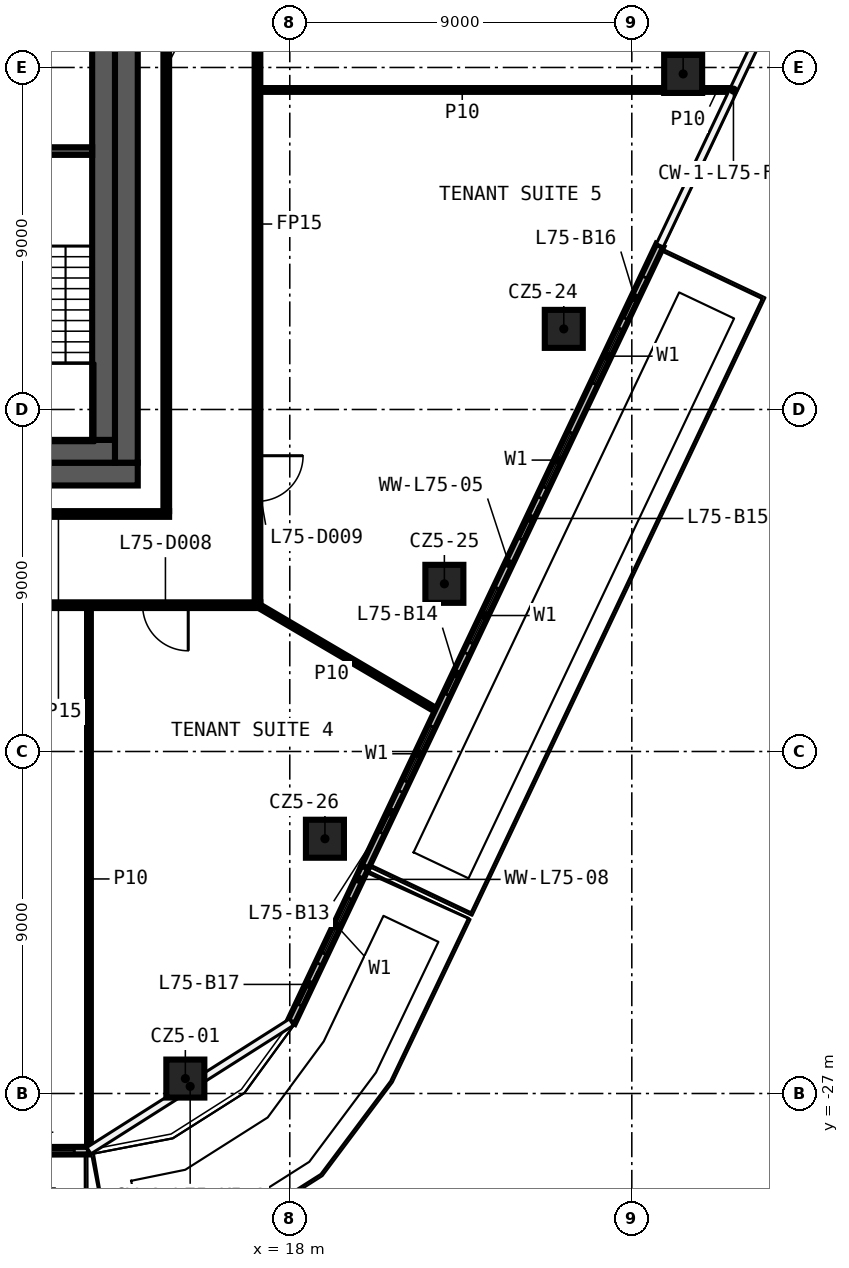
"""IFC4 building model, lengths in metres.
Left out: names, types, materials, properties, quantities, classifications, styles, units other than length and angle.
Written with IfcOpenShell. Run it as: python <this file> out.ifc"""

import sys

from ifc_helpers import new_model, si_unit, direction, frame, frame_2d, origin, origin_2d, place, context, subcontext, project, spatial, rectangle, extrude, element, fill, save


model = new_model("IFC4")
c1 = context("Model", 3, precision=1e-05, world=origin(), true_north=direction((0.0, 1.0)))
c2 = subcontext(c1, "Body", "Model", "MODEL_VIEW")
j1 = project(units=[si_unit("LENGTHUNIT", "METRE"), si_unit("PLANEANGLEUNIT", "RADIAN")], contexts=[c1])
p1 = place(None, origin())
s1 = spatial("IfcSite", under=j1, at=p1, CompositionType="ELEMENT")
p2 = place(p1, origin())
s2 = spatial("IfcBuilding", under=s1, at=p2, CompositionType="ELEMENT")
p3 = place(p2, frame((0.0, 0.0, 348.8)))
s3 = spatial("IfcBuildingStorey", under=s2, at=p3, CompositionType="ELEMENT", Elevation=348.8)
for number, where, z_axis, x_axis in (
    (1, (15.252, -26.607, 0.0), (0.0, 0.0, 1.0), (1.0, 0.0, 0.0)),
    (2, (28.351, -0.17, 0.0), (0.0, 0.0, 1.0), (1.0, 0.0, 0.0)),
    (3, (25.21, -6.879, 0.0), (0.0, 0.0, 1.0), (1.0, 0.0, 0.0)),
    (4, (22.068, -13.588, 0.0), (0.0, 0.0, 1.0), (1.0, 0.0, 0.0)),
    (5, (18.925, -20.296, 0.0), (0.0, 0.0, 1.0), (1.0, 0.0, 0.0)),
):
    element("IfcColumn", number, at=place(p3, frame(where, z_axis=z_axis, x_axis=x_axis)), inside=s3, PredefinedType="COLUMN", context=c2, shape_type="SweptSolid", body=[
        extrude(rectangle(XDim=1.0, YDim=1.0, at=origin_2d()), origin(), (0.0, 0.0, 1.0), 3.7),
    ])
p4 = place(p3, frame((17.225, -14.15, 0.0), z_axis=(0.0, 0.0, 1.0), x_axis=(-1.0, 0.0, 0.0)))
e6 = element("IfcWall", 6, at=p4, inside=s3, PredefinedType="PARTITIONING", context=c2, shape_type="SweptSolid", body=[
    extrude(rectangle(XDim=34.45, YDim=0.15, at=frame_2d((17.225, 0.0))), origin(), (0.0, 0.0, 1.0), 3.7),
])
p5 = place(p4, frame((31.464, 0.0, 0.0)))
e7 = element("IfcOpeningElement", 7, at=p5, cuts=e6, PredefinedType="OPENING", context=c2, shape_type="SweptSolid", body=[
    extrude(rectangle(XDim=1.2, YDim=2.1, at=frame_2d((0.6, 1.05))), frame((0.0, 0.085, 0.0), z_axis=(0.0, -1.0, 0.0), x_axis=(1.0, 0.0, 0.0)), (0.0, 0.0, 1.0), 0.17),
])
p6 = place(p4, frame((24.546, 0.0, 0.0)))
e8 = element("IfcOpeningElement", 8, at=p6, cuts=e6, PredefinedType="OPENING", context=c2, shape_type="SweptSolid", body=[
    extrude(rectangle(XDim=1.2, YDim=2.1, at=frame_2d((0.6, 1.05))), frame((0.0, 0.085, 0.0), z_axis=(0.0, -1.0, 0.0), x_axis=(1.0, 0.0, 0.0)), (0.0, 0.0, 1.0), 0.17),
])
p7 = place(p4, frame((19.962, 0.0, 0.0)))
e9 = element("IfcOpeningElement", 9, at=p7, cuts=e6, PredefinedType="OPENING", context=c2, shape_type="SweptSolid", body=[
    extrude(rectangle(XDim=1.2, YDim=2.1, at=frame_2d((0.6, 1.05))), frame((0.0, 0.085, 0.0), z_axis=(0.0, -1.0, 0.0), x_axis=(1.0, 0.0, 0.0)), (0.0, 0.0, 1.0), 0.17),
])
p8 = place(p4, frame((15.375, 0.0, 0.0)))
e10 = element("IfcOpeningElement", 10, at=p8, cuts=e6, PredefinedType="OPENING", context=c2, shape_type="SweptSolid", body=[
    extrude(rectangle(XDim=1.2, YDim=2.1, at=frame_2d((0.6, 1.05))), frame((0.0, 0.085, 0.0), z_axis=(0.0, -1.0, 0.0), x_axis=(1.0, 0.0, 0.0)), (0.0, 0.0, 1.0), 0.17),
])
p9 = place(p4, frame((10.788, 0.0, 0.0)))
e11 = element("IfcOpeningElement", 11, at=p9, cuts=e6, PredefinedType="OPENING", context=c2, shape_type="SweptSolid", body=[
    extrude(rectangle(XDim=1.2, YDim=2.1, at=frame_2d((0.6, 1.05))), frame((0.0, 0.085, 0.0), z_axis=(0.0, -1.0, 0.0), x_axis=(1.0, 0.0, 0.0)), (0.0, 0.0, 1.0), 0.17),
])
p10 = place(p4, frame((6.202, 0.0, 0.0)))
e12 = element("IfcOpeningElement", 12, at=p10, cuts=e6, PredefinedType="OPENING", context=c2, shape_type="SweptSolid", body=[
    extrude(rectangle(XDim=1.2, YDim=2.1, at=frame_2d((0.6, 1.05))), frame((0.0, 0.085, 0.0), z_axis=(0.0, -1.0, 0.0), x_axis=(1.0, 0.0, 0.0)), (0.0, 0.0, 1.0), 0.17),
])
p11 = place(p4, frame((1.897, 0.0, 0.0)))
e13 = element("IfcOpeningElement", 13, at=p11, cuts=e6, PredefinedType="OPENING", context=c2, shape_type="SweptSolid", body=[
    extrude(rectangle(XDim=1.2, YDim=2.1, at=frame_2d((0.6, 1.05))), frame((0.0, 0.085, 0.0), z_axis=(0.0, -1.0, 0.0), x_axis=(1.0, 0.0, 0.0)), (0.0, 0.0, 1.0), 0.17),
])
p12 = place(p3, frame((9.0, -11.75, 0.0), z_axis=(0.0, 0.0, 1.0), x_axis=(1.0, 0.0, 0.0)))
e14 = element("IfcWall", 14, at=p12, inside=s3, PredefinedType="PARTITIONING", context=c2, shape_type="SweptSolid", body=[
    extrude(rectangle(XDim=5.825, YDim=0.15, at=frame_2d((2.913, 0.0))), origin(), (0.0, 0.0, 1.0), 3.7),
])
p13 = place(p3, frame((17.225, -0.592, 0.0), z_axis=(0.0, 0.0, 1.0), x_axis=(1.0, 0.0, 0.0)))
e15 = element("IfcWall", 15, at=p13, inside=s3, PredefinedType="PARTITIONING", context=c2, shape_type="SweptSolid", body=[
    extrude(rectangle(XDim=10.626, YDim=0.1, at=frame_2d((5.313, 0.0))), origin(), (0.0, 0.0, 1.0), 3.7),
])
p14 = place(p3, frame((28.851, -0.592, 0.0), z_axis=(0.0, 0.0, 1.0), x_axis=(1.0, 0.0, 0.0)))
e16 = element("IfcWall", 16, at=p14, inside=s3, PredefinedType="PARTITIONING", context=c2, shape_type="SweptSolid", body=[
    extrude(rectangle(XDim=0.803, YDim=0.1, at=frame_2d((0.402, 0.0))), origin(), (0.0, 0.0, 1.0), 3.7),
])
p15 = place(p3, frame((17.15, 14.075, 0.0), z_axis=(0.0, 0.0, 1.0), x_axis=(0.0, -1.0, 0.0)))
e17 = element("IfcWall", 17, at=p15, inside=s3, PredefinedType="PARTITIONING", context=c2, shape_type="SweptSolid", body=[
    extrude(rectangle(XDim=28.15, YDim=0.15, at=frame_2d((14.075, 0.0))), origin(), (0.0, 0.0, 1.0), 3.7),
])
p16 = place(p15, frame((24.292, 0.0, 0.0)))
e18 = element("IfcOpeningElement", 18, at=p16, cuts=e17, PredefinedType="OPENING", context=c2, shape_type="SweptSolid", body=[
    extrude(rectangle(XDim=1.2, YDim=2.1, at=frame_2d((0.6, 1.05))), frame((0.0, 0.085, 0.0), z_axis=(0.0, -1.0, 0.0), x_axis=(1.0, 0.0, 0.0)), (0.0, 0.0, 1.0), 0.17),
])
p17 = place(p15, frame((10.898, 0.0, 0.0)))
e19 = element("IfcOpeningElement", 19, at=p17, cuts=e17, PredefinedType="OPENING", context=c2, shape_type="SweptSolid", body=[
    extrude(rectangle(XDim=1.2, YDim=2.1, at=frame_2d((0.6, 1.05))), frame((0.0, 0.085, 0.0), z_axis=(0.0, -1.0, 0.0), x_axis=(1.0, 0.0, 0.0)), (0.0, 0.0, 1.0), 0.17),
])
p18 = place(p15, frame((3.873, 0.0, 0.0)))
e20 = element("IfcOpeningElement", 20, at=p18, cuts=e17, PredefinedType="OPENING", context=c2, shape_type="SweptSolid", body=[
    extrude(rectangle(XDim=1.2, YDim=2.1, at=frame_2d((0.6, 1.05))), frame((0.0, 0.085, 0.0), z_axis=(0.0, -1.0, 0.0), x_axis=(1.0, 0.0, 0.0)), (0.0, 0.0, 1.0), 0.17),
])
p19 = place(p3, frame((14.75, -11.675, 0.0), z_axis=(0.0, 0.0, 1.0), x_axis=(0.0, 1.0, 0.0)))
e21 = element("IfcWall", 21, at=p19, inside=s3, PredefinedType="PARTITIONING", context=c2, shape_type="SweptSolid", body=[
    extrude(rectangle(XDim=23.35, YDim=0.15, at=frame_2d((11.675, 0.0))), origin(), (0.0, 0.0, 1.0), 3.7),
])
p20 = place(p3, frame((12.716, -28.483, 0.0), z_axis=(0.0, 0.0, 1.0), x_axis=(0.0, 1.0, 0.0)))
e22 = element("IfcWall", 22, at=p20, inside=s3, PredefinedType="PARTITIONING", context=c2, shape_type="SweptSolid", body=[
    extrude(rectangle(XDim=14.258, YDim=0.1, at=frame_2d((7.129, 0.0))), origin(), (0.0, 0.0, 1.0), 3.7),
])
p21 = place(p3, frame((17.15, -14.15, 0.0), z_axis=(0.0, 0.0, 1.0), x_axis=(0.862152840624, -0.506648279781, 0.0)))
e23 = element("IfcWall", 23, at=p21, inside=s3, PredefinedType="PARTITIONING", context=c2, shape_type="SweptSolid", body=[
    extrude(rectangle(XDim=5.51, YDim=0.1, at=frame_2d((2.755, 0.0))), origin(), (0.0, 0.0, 1.0), 3.7),
])
p22 = place(p3, frame((-1.042, -28.546, 0.0), z_axis=(0.0, 0.0, 1.0), x_axis=(0.999995287953, 0.003069865224, 0.0)))
e24 = element("IfcWall", 24, at=p22, inside=s3, PredefinedType="SOLIDWALL", context=c2, shape_type="SweptSolid", body=[
    extrude(rectangle(XDim=13.758, YDim=0.2, at=frame_2d((6.879, 0.0))), origin(), (0.0, 0.0, 1.0), 3.7),
])
p23 = place(p22, frame((2.0, 0.0, 0.6)))
e25 = element("IfcOpeningElement", 25, at=p23, cuts=e24, PredefinedType="OPENING", context=c2, shape_type="SweptSolid", body=[
    extrude(rectangle(XDim=1.6, YDim=2.4, at=frame_2d((0.8, 1.2))), frame((0.0, 0.11, 0.0), z_axis=(0.0, -1.0, 0.0), x_axis=(1.0, 0.0, 0.0)), (0.0, 0.0, 1.0), 0.22),
])
p24 = place(p22, frame((0.5, 0.0, 0.0)))
e26 = element("IfcOpeningElement", 26, at=p24, cuts=e24, PredefinedType="OPENING", context=c2, shape_type="SweptSolid", body=[
    extrude(rectangle(XDim=1.2, YDim=2.4, at=frame_2d((0.6, 1.2))), frame((0.0, 0.11, 0.0), z_axis=(0.0, -1.0, 0.0), x_axis=(1.0, 0.0, 0.0)), (0.0, 0.0, 1.0), 0.22),
])
p25 = place(p22, frame((6.586, 0.0, 0.6)))
e27 = element("IfcOpeningElement", 27, at=p25, cuts=e24, PredefinedType="OPENING", context=c2, shape_type="SweptSolid", body=[
    extrude(rectangle(XDim=1.6, YDim=2.4, at=frame_2d((0.8, 1.2))), frame((0.0, 0.11, 0.0), z_axis=(0.0, -1.0, 0.0), x_axis=(1.0, 0.0, 0.0)), (0.0, 0.0, 1.0), 0.22),
])
p26 = place(p22, frame((5.086, 0.0, 0.0)))
e28 = element("IfcOpeningElement", 28, at=p26, cuts=e24, PredefinedType="OPENING", context=c2, shape_type="SweptSolid", body=[
    extrude(rectangle(XDim=1.2, YDim=2.4, at=frame_2d((0.6, 1.2))), frame((0.0, 0.11, 0.0), z_axis=(0.0, -1.0, 0.0), x_axis=(1.0, 0.0, 0.0)), (0.0, 0.0, 1.0), 0.22),
])
p27 = place(p22, frame((11.772, 0.0, 0.6)))
e29 = element("IfcOpeningElement", 29, at=p27, cuts=e24, PredefinedType="OPENING", context=c2, shape_type="SweptSolid", body=[
    extrude(rectangle(XDim=1.6, YDim=2.4, at=frame_2d((0.8, 1.2))), frame((0.0, 0.11, 0.0), z_axis=(0.0, -1.0, 0.0), x_axis=(1.0, 0.0, 0.0)), (0.0, 0.0, 1.0), 0.22),
])
p28 = place(p22, frame((10.272, 0.0, 0.0)))
e30 = element("IfcOpeningElement", 30, at=p28, cuts=e24, PredefinedType="OPENING", context=c2, shape_type="SweptSolid", body=[
    extrude(rectangle(XDim=1.2, YDim=2.4, at=frame_2d((0.6, 1.2))), frame((0.0, 0.11, 0.0), z_axis=(0.0, -1.0, 0.0), x_axis=(1.0, 0.0, 0.0)), (0.0, 0.0, 1.0), 0.22),
])
p29 = place(p3, frame((19.978, -21.042, 0.0), z_axis=(0.0, 0.0, 1.0), x_axis=(0.428526209531, 0.903529350793, 0.0)))
e31 = element("IfcWall", 31, at=p29, inside=s3, PredefinedType="SOLIDWALL", context=c2, shape_type="SweptSolid", body=[
    extrude(rectangle(XDim=18.107, YDim=0.2, at=frame_2d((9.053, 0.0))), origin(), (0.0, 0.0, 1.0), 3.7),
])
p30 = place(p29, frame((2.5, 0.0, 0.6)))
e32 = element("IfcOpeningElement", 32, at=p30, cuts=e31, PredefinedType="OPENING", context=c2, shape_type="SweptSolid", body=[
    extrude(rectangle(XDim=1.6, YDim=2.4, at=frame_2d((0.8, 1.2))), frame((0.0, 0.11, 0.0), z_axis=(0.0, -1.0, 0.0), x_axis=(1.0, 0.0, 0.0)), (0.0, 0.0, 1.0), 0.22),
])
p31 = place(p29, frame((1.0, 0.0, 0.0)))
e33 = element("IfcOpeningElement", 33, at=p31, cuts=e31, PredefinedType="OPENING", context=c2, shape_type="SweptSolid", body=[
    extrude(rectangle(XDim=1.2, YDim=2.4, at=frame_2d((0.6, 1.2))), frame((0.0, 0.11, 0.0), z_axis=(0.0, -1.0, 0.0), x_axis=(1.0, 0.0, 0.0)), (0.0, 0.0, 1.0), 0.22),
])
p32 = place(p29, frame((6.527, 0.0, 0.6)))
e34 = element("IfcOpeningElement", 34, at=p32, cuts=e31, PredefinedType="OPENING", context=c2, shape_type="SweptSolid", body=[
    extrude(rectangle(XDim=1.6, YDim=2.4, at=frame_2d((0.8, 1.2))), frame((0.0, 0.11, 0.0), z_axis=(0.0, -1.0, 0.0), x_axis=(1.0, 0.0, 0.0)), (0.0, 0.0, 1.0), 0.22),
])
p33 = place(p29, frame((5.027, 0.0, 0.0)))
e35 = element("IfcOpeningElement", 35, at=p33, cuts=e31, PredefinedType="OPENING", context=c2, shape_type="SweptSolid", body=[
    extrude(rectangle(XDim=1.2, YDim=2.4, at=frame_2d((0.6, 1.2))), frame((0.0, 0.11, 0.0), z_axis=(0.0, -1.0, 0.0), x_axis=(1.0, 0.0, 0.0)), (0.0, 0.0, 1.0), 0.22),
])
p34 = place(p29, frame((11.053, 0.0, 0.6)))
e36 = element("IfcOpeningElement", 36, at=p34, cuts=e31, PredefinedType="OPENING", context=c2, shape_type="SweptSolid", body=[
    extrude(rectangle(XDim=1.6, YDim=2.4, at=frame_2d((0.8, 1.2))), frame((0.0, 0.11, 0.0), z_axis=(0.0, -1.0, 0.0), x_axis=(1.0, 0.0, 0.0)), (0.0, 0.0, 1.0), 0.22),
])
p35 = place(p29, frame((9.553, 0.0, 0.0)))
e37 = element("IfcOpeningElement", 37, at=p35, cuts=e31, PredefinedType="OPENING", context=c2, shape_type="SweptSolid", body=[
    extrude(rectangle(XDim=1.2, YDim=2.4, at=frame_2d((0.6, 1.2))), frame((0.0, 0.11, 0.0), z_axis=(0.0, -1.0, 0.0), x_axis=(1.0, 0.0, 0.0)), (0.0, 0.0, 1.0), 0.22),
])
p36 = place(p29, frame((14.08, 0.0, 0.6)))
e38 = element("IfcOpeningElement", 38, at=p36, cuts=e31, PredefinedType="OPENING", context=c2, shape_type="SweptSolid", body=[
    extrude(rectangle(XDim=1.6, YDim=2.4, at=frame_2d((0.8, 1.2))), frame((0.0, 0.11, 0.0), z_axis=(0.0, -1.0, 0.0), x_axis=(1.0, 0.0, 0.0)), (0.0, 0.0, 1.0), 0.22),
])
p37 = place(p29, frame((15.98, 0.0, 0.0)))
e39 = element("IfcOpeningElement", 39, at=p37, cuts=e31, PredefinedType="OPENING", context=c2, shape_type="SweptSolid", body=[
    extrude(rectangle(XDim=1.2, YDim=2.4, at=frame_2d((0.6, 1.2))), frame((0.0, 0.11, 0.0), z_axis=(0.0, -1.0, 0.0), x_axis=(1.0, 0.0, 0.0)), (0.0, 0.0, 1.0), 0.22),
])
p38 = place(p3, frame((18.042, -25.123, 0.0), z_axis=(0.0, 0.0, 1.0), x_axis=(0.428481259611, 0.903550668287, 0.0)))
e40 = element("IfcWall", 40, at=p38, inside=s3, PredefinedType="SOLIDWALL", context=c2, shape_type="SweptSolid", body=[
    extrude(rectangle(XDim=4.517, YDim=0.2, at=frame_2d((2.259, 0.0))), origin(), (0.0, 0.0, 1.0), 3.7),
])
p39 = place(p38, frame((2.0, 0.0, 0.6)))
e41 = element("IfcOpeningElement", 41, at=p39, cuts=e40, PredefinedType="OPENING", context=c2, shape_type="SweptSolid", body=[
    extrude(rectangle(XDim=1.6, YDim=2.4, at=frame_2d((0.8, 1.2))), frame((0.0, 0.11, 0.0), z_axis=(0.0, -1.0, 0.0), x_axis=(1.0, 0.0, 0.0)), (0.0, 0.0, 1.0), 0.22),
])
p40 = place(p38, frame((0.5, 0.0, 0.0)))
e42 = element("IfcOpeningElement", 42, at=p40, cuts=e40, PredefinedType="OPENING", context=c2, shape_type="SweptSolid", body=[
    extrude(rectangle(XDim=1.2, YDim=2.4, at=frame_2d((0.6, 1.2))), frame((0.0, 0.11, 0.0), z_axis=(0.0, -1.0, 0.0), x_axis=(1.0, 0.0, 0.0)), (0.0, 0.0, 1.0), 0.22),
])
p41 = place(p3, frame((14.0, -10.7, 0.0), z_axis=(0.0, 0.0, 1.0), x_axis=(-1.0, 0.0, 0.0)))
e43 = element("IfcWall", 43, at=p41, inside=s3, PredefinedType="SHEAR", context=c2, shape_type="SweptSolid", body=[
    extrude(rectangle(XDim=28.0, YDim=0.6, at=frame_2d((14.0, 0.0))), origin(), (0.0, 0.0, 1.0), 3.7),
])
p42 = place(p41, frame((5.1, 0.0, 0.0)))
e44 = element("IfcOpeningElement", 44, at=p42, cuts=e43, PredefinedType="OPENING", context=c2, shape_type="SweptSolid", body=[
    extrude(rectangle(XDim=1.6, YDim=2.1, at=frame_2d((0.8, 1.05))), frame((0.0, 0.31, 0.0), z_axis=(0.0, -1.0, 0.0), x_axis=(1.0, 0.0, 0.0)), (0.0, 0.0, 1.0), 0.62),
])
p43 = place(p3, frame((13.7, 10.4, 0.0), z_axis=(0.0, 0.0, 1.0), x_axis=(0.0, -1.0, 0.0)))
e45 = element("IfcWall", 45, at=p43, inside=s3, PredefinedType="SHEAR", context=c2, shape_type="SweptSolid", body=[
    extrude(rectangle(XDim=20.8, YDim=0.6, at=frame_2d((10.4, 0.0))), origin(), (0.0, 0.0, 1.0), 3.7),
])
p44 = place(p3, frame((13.4, -10.1, 0.0), z_axis=(0.0, 0.0, 1.0), x_axis=(-1.0, 0.0, 0.0)))
e46 = element("IfcWall", 46, at=p44, inside=s3, PredefinedType="SHEAR", context=c2, shape_type="SweptSolid", body=[
    extrude(rectangle(XDim=4.1, YDim=0.6, at=frame_2d((2.05, 0.0))), origin(), (0.0, 0.0, 1.0), 3.7),
])
p45 = place(p3, frame((13.1, 9.8, 0.0), z_axis=(0.0, 0.0, 1.0), x_axis=(0.0, -1.0, 0.0)))
e47 = element("IfcWall", 47, at=p45, inside=s3, PredefinedType="SHEAR", context=c2, shape_type="SweptSolid", body=[
    extrude(rectangle(XDim=19.6, YDim=0.6, at=frame_2d((9.8, 0.0))), origin(), (0.0, 0.0, 1.0), 3.7),
])
p46 = place(p3, frame((9.45, -2.2, 0.0), z_axis=(0.0, 0.0, 1.0), x_axis=(1.0, 0.0, 0.0)))
e48 = element("IfcWall", 48, at=p46, inside=s3, PredefinedType="SHEAR", context=c2, shape_type="SweptSolid", body=[
    extrude(rectangle(XDim=3.35, YDim=0.2, at=frame_2d((1.675, 0.0))), origin(), (0.0, 0.0, 1.0), 3.7),
])
p47 = place(p11, origin())
e49 = element("IfcDoor", 49, at=p47, inside=s3, OperationType="SINGLE_SWING_LEFT", PredefinedType="DOOR", context=c2, shape_type="SweptSolid", body=[
    extrude(rectangle(XDim=1.2, YDim=2.1, at=frame_2d((0.6, 1.05))), frame((0.0, 0.025, 0.0), z_axis=(0.0, -1.0, 0.0), x_axis=(1.0, 0.0, 0.0)), (0.0, 0.0, 1.0), 0.05),
])
fill(e13, e49)
p48 = place(p16, origin())
e50 = element("IfcDoor", 50, at=p48, inside=s3, OperationType="SINGLE_SWING_RIGHT", PredefinedType="DOOR", context=c2, shape_type="SweptSolid", body=[
    extrude(rectangle(XDim=1.2, YDim=2.1, at=frame_2d((0.6, 1.05))), frame((0.0, 0.025, 0.0), z_axis=(0.0, -1.0, 0.0), x_axis=(1.0, 0.0, 0.0)), (0.0, 0.0, 1.0), 0.05),
])
fill(e18, e50)
p49 = place(p27, origin())
e51 = element("IfcWindow", 51, at=p49, inside=s3, PartitioningType="SINGLE_PANEL", PredefinedType="WINDOW", context=c2, shape_type="SweptSolid", body=[
    extrude(rectangle(XDim=1.6, YDim=2.4, at=frame_2d((0.8, 1.2))), frame((0.0, 0.03, 0.0), z_axis=(0.0, -1.0, 0.0), x_axis=(1.0, 0.0, 0.0)), (0.0, 0.0, 1.0), 0.06),
])
fill(e29, e51)
p50 = place(p30, origin())
e52 = element("IfcWindow", 52, at=p50, inside=s3, PartitioningType="SINGLE_PANEL", PredefinedType="WINDOW", context=c2, shape_type="SweptSolid", body=[
    extrude(rectangle(XDim=1.6, YDim=2.4, at=frame_2d((0.8, 1.2))), frame((0.0, 0.03, 0.0), z_axis=(0.0, -1.0, 0.0), x_axis=(1.0, 0.0, 0.0)), (0.0, 0.0, 1.0), 0.06),
])
fill(e32, e52)
p51 = place(p31, origin())
e53 = element("IfcDoor", 53, at=p51, inside=s3, OperationType="SLIDING_TO_LEFT", PredefinedType="DOOR", context=c2, shape_type="SweptSolid", body=[
    extrude(rectangle(XDim=1.2, YDim=2.4, at=frame_2d((0.6, 1.2))), frame((0.0, 0.025, 0.0), z_axis=(0.0, -1.0, 0.0), x_axis=(1.0, 0.0, 0.0)), (0.0, 0.0, 1.0), 0.05),
])
fill(e33, e53)
p52 = place(p32, origin())
e54 = element("IfcWindow", 54, at=p52, inside=s3, PartitioningType="SINGLE_PANEL", PredefinedType="WINDOW", context=c2, shape_type="SweptSolid", body=[
    extrude(rectangle(XDim=1.6, YDim=2.4, at=frame_2d((0.8, 1.2))), frame((0.0, 0.03, 0.0), z_axis=(0.0, -1.0, 0.0), x_axis=(1.0, 0.0, 0.0)), (0.0, 0.0, 1.0), 0.06),
])
fill(e34, e54)
p53 = place(p33, origin())
e55 = element("IfcDoor", 55, at=p53, inside=s3, OperationType="SLIDING_TO_LEFT", PredefinedType="DOOR", context=c2, shape_type="SweptSolid", body=[
    extrude(rectangle(XDim=1.2, YDim=2.4, at=frame_2d((0.6, 1.2))), frame((0.0, 0.025, 0.0), z_axis=(0.0, -1.0, 0.0), x_axis=(1.0, 0.0, 0.0)), (0.0, 0.0, 1.0), 0.05),
])
fill(e35, e55)
p54 = place(p34, origin())
e56 = element("IfcWindow", 56, at=p54, inside=s3, PartitioningType="SINGLE_PANEL", PredefinedType="WINDOW", context=c2, shape_type="SweptSolid", body=[
    extrude(rectangle(XDim=1.6, YDim=2.4, at=frame_2d((0.8, 1.2))), frame((0.0, 0.03, 0.0), z_axis=(0.0, -1.0, 0.0), x_axis=(1.0, 0.0, 0.0)), (0.0, 0.0, 1.0), 0.06),
])
fill(e36, e56)
p55 = place(p35, origin())
e57 = element("IfcDoor", 57, at=p55, inside=s3, OperationType="SLIDING_TO_LEFT", PredefinedType="DOOR", context=c2, shape_type="SweptSolid", body=[
    extrude(rectangle(XDim=1.2, YDim=2.4, at=frame_2d((0.6, 1.2))), frame((0.0, 0.025, 0.0), z_axis=(0.0, -1.0, 0.0), x_axis=(1.0, 0.0, 0.0)), (0.0, 0.0, 1.0), 0.05),
])
fill(e37, e57)
p56 = place(p36, origin())
e58 = element("IfcWindow", 58, at=p56, inside=s3, PartitioningType="SINGLE_PANEL", PredefinedType="WINDOW", context=c2, shape_type="SweptSolid", body=[
    extrude(rectangle(XDim=1.6, YDim=2.4, at=frame_2d((0.8, 1.2))), frame((0.0, 0.03, 0.0), z_axis=(0.0, -1.0, 0.0), x_axis=(1.0, 0.0, 0.0)), (0.0, 0.0, 1.0), 0.06),
])
fill(e38, e58)
p57 = place(p37, origin())
e59 = element("IfcDoor", 59, at=p57, inside=s3, OperationType="SLIDING_TO_LEFT", PredefinedType="DOOR", context=c2, shape_type="SweptSolid", body=[
    extrude(rectangle(XDim=1.2, YDim=2.4, at=frame_2d((0.6, 1.2))), frame((0.0, 0.025, 0.0), z_axis=(0.0, -1.0, 0.0), x_axis=(1.0, 0.0, 0.0)), (0.0, 0.0, 1.0), 0.05),
])
fill(e39, e59)
p58 = place(p39, origin())
e60 = element("IfcWindow", 60, at=p58, inside=s3, PartitioningType="SINGLE_PANEL", PredefinedType="WINDOW", context=c2, shape_type="SweptSolid", body=[
    extrude(rectangle(XDim=1.6, YDim=2.4, at=frame_2d((0.8, 1.2))), frame((0.0, 0.03, 0.0), z_axis=(0.0, -1.0, 0.0), x_axis=(1.0, 0.0, 0.0)), (0.0, 0.0, 1.0), 0.06),
])
fill(e41, e60)
p59 = place(p40, origin())
e61 = element("IfcDoor", 61, at=p59, inside=s3, OperationType="SLIDING_TO_LEFT", PredefinedType="DOOR", context=c2, shape_type="SweptSolid", body=[
    extrude(rectangle(XDim=1.2, YDim=2.4, at=frame_2d((0.6, 1.2))), frame((0.0, 0.025, 0.0), z_axis=(0.0, -1.0, 0.0), x_axis=(1.0, 0.0, 0.0)), (0.0, 0.0, 1.0), 0.05),
])
fill(e42, e61)
save(model, sys.argv[1])
